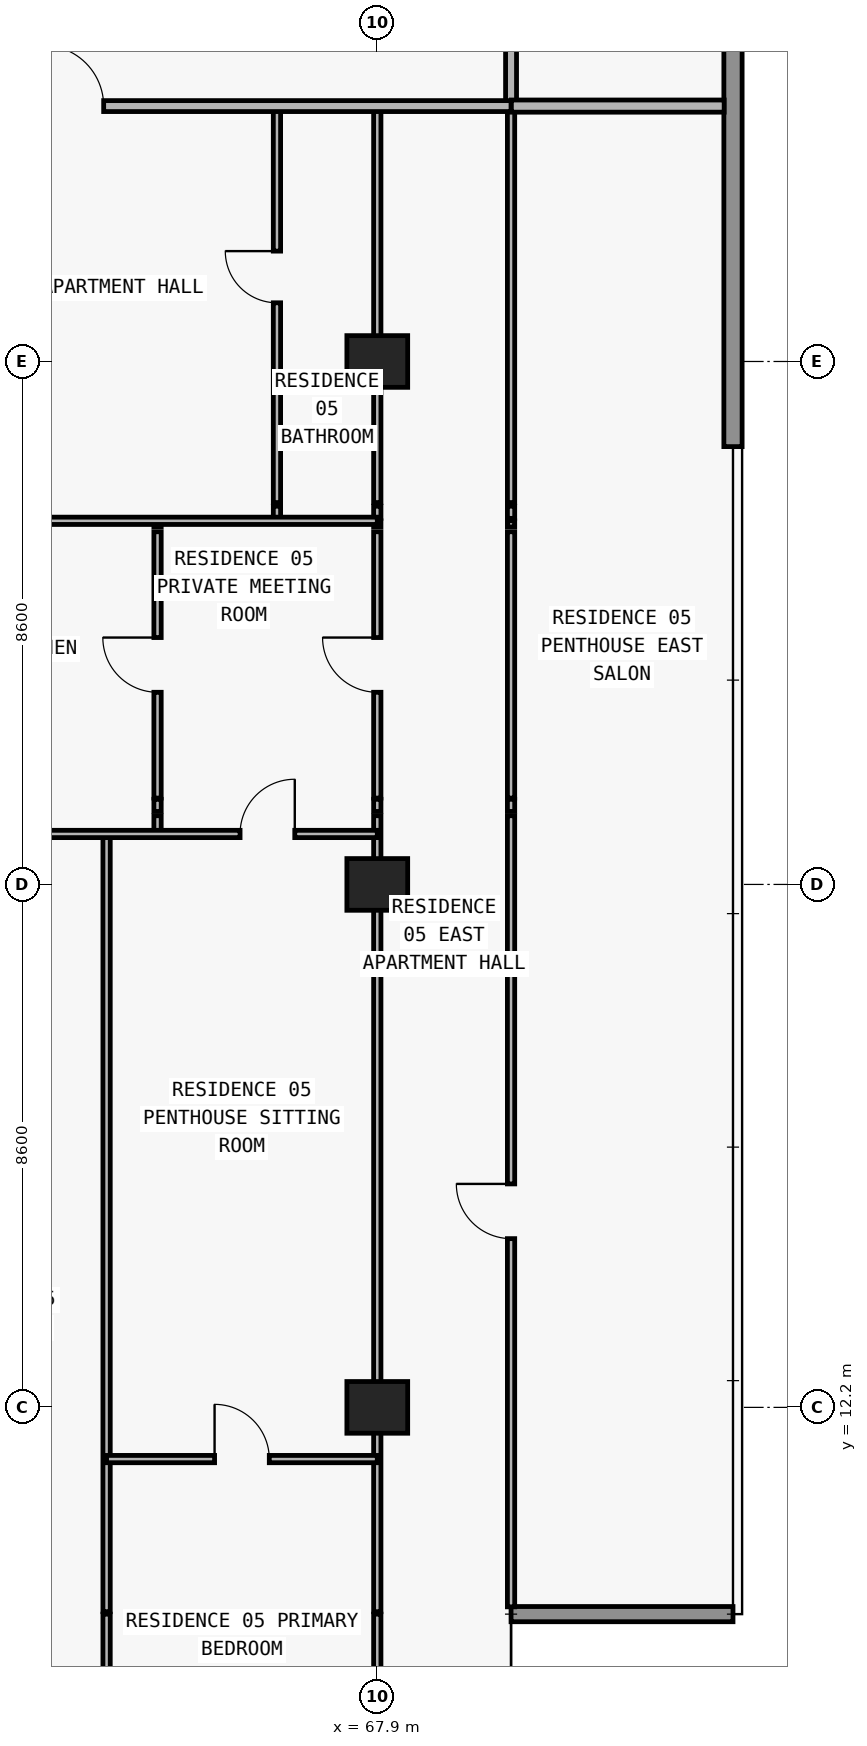
"""IFC4 building model, lengths in metres.
Left out: names, types, materials, properties, quantities, classifications, styles, units other than length and angle.
Written with IfcOpenShell. Run it as: python <this file> out.ifc"""

import sys

from ifc_helpers import new_model, si_unit, direction, frame, frame_2d, origin, origin_2d, place, context, subcontext, project, spatial, rectangle, extrude, element, fill, save


model = new_model("IFC4")
c1 = context("Model", 3, precision=1e-05, world=origin(), true_north=direction((0.0, 1.0)))
c2 = subcontext(c1, "Body", "Model", "MODEL_VIEW")
j1 = project(units=[si_unit("LENGTHUNIT", "METRE"), si_unit("PLANEANGLEUNIT", "RADIAN")], contexts=[c1])
p1 = place(None, origin())
s1 = spatial("IfcSite", under=j1, at=p1, CompositionType="ELEMENT")
p2 = place(p1, origin())
s2 = spatial("IfcBuilding", under=s1, at=p2, CompositionType="ELEMENT")
p3 = place(p2, frame((0.0, 0.0, 119.1)))
s3 = spatial("IfcBuildingStorey", under=s2, at=p3, CompositionType="ELEMENT", Elevation=119.1)
for number, where, z_axis, x_axis in (
    (1, (67.9, 12.2, 0.0), (0.0, 0.0, 1.0), (1.0, 0.0, 0.0)),
    (2, (67.9, 20.8, 0.0), (0.0, 0.0, 1.0), (1.0, 0.0, 0.0)),
    (3, (67.9, 29.4, 0.0), (0.0, 0.0, 1.0), (1.0, 0.0, 0.0)),
):
    element("IfcColumn", number, at=place(p3, frame(where, z_axis=z_axis, x_axis=x_axis)), inside=s3, PredefinedType="COLUMN", context=c2, shape_type="SweptSolid", body=[
        extrude(rectangle(XDim=1.0, YDim=0.85, at=origin_2d()), origin(), (0.0, 0.0, 1.0), 3.05),
    ])
p4 = place(p3, frame((70.1, 8.8, 0.0), z_axis=(0.0, 0.0, 1.0), x_axis=(1.0, 0.0, 0.0)))
e4 = element("IfcWall", 4, at=p4, inside=s3, PredefinedType="ELEMENTEDWALL", context=c2, shape_type="SweptSolid", body=[
    extrude(rectangle(XDim=3.65, YDim=0.25, at=frame_2d((1.825, 0.0))), origin(), (0.0, 0.0, 1.0), 3.05),
])
p5 = place(p3, frame((73.75, 47.2, 0.0), z_axis=(0.0, 0.0, 1.0), x_axis=(0.0, -1.0, 0.0)))
e5 = element("IfcWall", 5, at=p5, inside=s3, PredefinedType="STANDARD", context=c2, shape_type="SweptSolid", body=[
    extrude(rectangle(XDim=19.2, YDim=0.3, at=frame_2d((9.6, 0.0))), origin(), (0.0, 0.0, 1.0), 3.05),
])
p6 = place(p3, frame((63.448, 5.695, 0.0), z_axis=(0.0, 0.0, 1.0), x_axis=(0.0, 1.0, 0.0)))
e6 = element("IfcWall", 6, at=p6, inside=s3, PredefinedType="PARTITIONING", context=c2, shape_type="SweptSolid", body=[
    extrude(rectangle(XDim=3.105, YDim=0.12, at=frame_2d((1.552, 0.0))), origin(), (0.0, 0.0, 1.0), 3.05),
])
p7 = place(p3, frame((63.448, 8.84, 0.0), z_axis=(0.0, 0.0, 1.0), x_axis=(0.0, 1.0, 0.0)))
e7 = element("IfcWall", 7, at=p7, inside=s3, PredefinedType="PARTITIONING", context=c2, shape_type="SweptSolid", body=[
    extrude(rectangle(XDim=12.79, YDim=0.12, at=frame_2d((6.395, 0.0))), origin(), (0.0, 0.0, 1.0), 3.05),
])
p8 = place(p3, frame((64.286, 21.63, 0.0), z_axis=(0.0, 0.0, 1.0), x_axis=(0.0, 1.0, 0.0)))
e8 = element("IfcWall", 8, at=p8, inside=s3, PredefinedType="PARTITIONING", context=c2, shape_type="SweptSolid", body=[
    extrude(rectangle(XDim=0.3, YDim=0.12, at=frame_2d((0.15, 0.0))), origin(), (0.0, 0.0, 1.0), 3.05),
])
p9 = place(p3, frame((64.286, 22.0, 0.0), z_axis=(0.0, 0.0, 1.0), x_axis=(0.0, 1.0, 0.0)))
e9 = element("IfcWall", 9, at=p9, inside=s3, PredefinedType="PARTITIONING", context=c2, shape_type="SweptSolid", body=[
    extrude(rectangle(XDim=0.2, YDim=0.12, at=frame_2d((0.1, 0.0))), origin(), (0.0, 0.0, 1.0), 3.05),
])
p10 = place(p3, frame((64.286, 22.22, 0.0), z_axis=(0.0, 0.0, 1.0), x_axis=(0.0, 1.0, 0.0)))
e10 = element("IfcWall", 10, at=p10, inside=s3, PredefinedType="PARTITIONING", context=c2, shape_type="SweptSolid", body=[
    extrude(rectangle(XDim=4.38, YDim=0.12, at=frame_2d((2.19, 0.0))), origin(), (0.0, 0.0, 1.0), 3.05),
])
p11 = place(p10, frame((1.74, 0.0, 0.0)))
e11 = element("IfcOpeningElement", 11, at=p11, cuts=e10, PredefinedType="OPENING", context=c2, shape_type="SweptSolid", body=[
    extrude(rectangle(XDim=0.9, YDim=2.15, at=frame_2d((0.45, 1.075))), frame((0.0, 0.07, 0.0), z_axis=(0.0, -1.0, 0.0), x_axis=(1.0, 0.0, 0.0)), (0.0, 0.0, 1.0), 0.14),
])
p12 = place(p3, frame((64.286, 26.68, 0.0), z_axis=(0.0, 0.0, 1.0), x_axis=(0.0, 1.0, 0.0)))
e12 = element("IfcWall", 12, at=p12, inside=s3, PredefinedType="PARTITIONING", context=c2, shape_type="SweptSolid", body=[
    extrude(rectangle(XDim=0.1, YDim=0.12, at=frame_2d((0.05, 0.0))), origin(), (0.0, 0.0, 1.0), 3.05),
])
p13 = place(p3, frame((66.25, 26.82, 0.0), z_axis=(0.0, 0.0, 1.0), x_axis=(0.0, 1.0, 0.0)))
e13 = element("IfcWall", 13, at=p13, inside=s3, PredefinedType="PARTITIONING", context=c2, shape_type="SweptSolid", body=[
    extrude(rectangle(XDim=0.2, YDim=0.12, at=frame_2d((0.1, 0.0))), origin(), (0.0, 0.0, 1.0), 3.05),
])
p14 = place(p3, frame((66.25, 27.08, 0.0), z_axis=(0.0, 0.0, 1.0), x_axis=(0.0, 1.0, 0.0)))
e14 = element("IfcWall", 14, at=p14, inside=s3, PredefinedType="PARTITIONING", context=c2, shape_type="SweptSolid", body=[
    extrude(rectangle(XDim=6.52, YDim=0.12, at=frame_2d((3.26, 0.0))), origin(), (0.0, 0.0, 1.0), 3.05),
])
p15 = place(p14, frame((3.285, 0.0, 0.0)))
e15 = element("IfcOpeningElement", 15, at=p15, cuts=e14, PredefinedType="OPENING", context=c2, shape_type="SweptSolid", body=[
    extrude(rectangle(XDim=0.85, YDim=2.1, at=frame_2d((0.425, 1.05))), frame((0.0, 0.07, 0.0), z_axis=(0.0, -1.0, 0.0), x_axis=(1.0, 0.0, 0.0)), (0.0, 0.0, 1.0), 0.14),
])
p16 = place(p3, frame((67.9, 5.695, 0.0), z_axis=(0.0, 0.0, 1.0), x_axis=(0.0, 1.0, 0.0)))
e16 = element("IfcWall", 16, at=p16, inside=s3, PredefinedType="PARTITIONING", context=c2, shape_type="SweptSolid", body=[
    extrude(rectangle(XDim=3.105, YDim=0.12, at=frame_2d((1.552, 0.0))), origin(), (0.0, 0.0, 1.0), 3.05),
])
p17 = place(p3, frame((67.9, 8.84, 0.0), z_axis=(0.0, 0.0, 1.0), x_axis=(0.0, 1.0, 0.0)))
e17 = element("IfcWall", 17, at=p17, inside=s3, PredefinedType="PARTITIONING", context=c2, shape_type="SweptSolid", body=[
    extrude(rectangle(XDim=13.09, YDim=0.12, at=frame_2d((6.545, 0.0))), origin(), (0.0, 0.0, 1.0), 2.174),
])
p18 = place(p3, frame((67.9, 22.0, 0.0), z_axis=(0.0, 0.0, 1.0), x_axis=(0.0, 1.0, 0.0)))
e18 = element("IfcWall", 18, at=p18, inside=s3, PredefinedType="PARTITIONING", context=c2, shape_type="SweptSolid", body=[
    extrude(rectangle(XDim=0.2, YDim=0.12, at=frame_2d((0.1, 0.0))), origin(), (0.0, 0.0, 1.0), 2.174),
])
p19 = place(p3, frame((67.9, 22.22, 0.0), z_axis=(0.0, 0.0, 1.0), x_axis=(0.0, 1.0, 0.0)))
e19 = element("IfcWall", 19, at=p19, inside=s3, PredefinedType="PARTITIONING", context=c2, shape_type="SweptSolid", body=[
    extrude(rectangle(XDim=4.38, YDim=0.12, at=frame_2d((2.19, 0.0))), origin(), (0.0, 0.0, 1.0), 2.174),
])
p20 = place(p19, frame((1.74, 0.0, 0.0)))
e20 = element("IfcOpeningElement", 20, at=p20, cuts=e19, PredefinedType="OPENING", context=c2, shape_type="SweptSolid", body=[
    extrude(rectangle(XDim=0.9, YDim=2.124, at=frame_2d((0.45, 1.062))), frame((0.0, 0.07, 0.0), z_axis=(0.0, -1.0, 0.0), x_axis=(1.0, 0.0, 0.0)), (0.0, 0.0, 1.0), 0.14),
])
p21 = place(p3, frame((67.9, 26.68, 0.0), z_axis=(0.0, 0.0, 1.0), x_axis=(0.0, 1.0, 0.0)))
e21 = element("IfcWall", 21, at=p21, inside=s3, PredefinedType="PARTITIONING", context=c2, shape_type="SweptSolid", body=[
    extrude(rectangle(XDim=0.1, YDim=0.12, at=frame_2d((0.05, 0.0))), origin(), (0.0, 0.0, 1.0), 2.174),
])
p22 = place(p3, frame((67.9, 26.82, 0.0), z_axis=(0.0, 0.0, 1.0), x_axis=(0.0, 1.0, 0.0)))
e22 = element("IfcWall", 22, at=p22, inside=s3, PredefinedType="PARTITIONING", context=c2, shape_type="SweptSolid", body=[
    extrude(rectangle(XDim=0.2, YDim=0.12, at=frame_2d((0.1, 0.0))), origin(), (0.0, 0.0, 1.0), 2.174),
])
p23 = place(p3, frame((67.9, 27.08, 0.0), z_axis=(0.0, 0.0, 1.0), x_axis=(0.0, 1.0, 0.0)))
e23 = element("IfcWall", 23, at=p23, inside=s3, PredefinedType="PARTITIONING", context=c2, shape_type="SweptSolid", body=[
    extrude(rectangle(XDim=6.52, YDim=0.12, at=frame_2d((3.26, 0.0))), origin(), (0.0, 0.0, 1.0), 2.174),
])
p24 = place(p3, frame((70.1, 8.92, 0.0), z_axis=(0.0, 0.0, 1.0), x_axis=(0.0, 1.0, 0.0)))
e24 = element("IfcWall", 24, at=p24, inside=s3, PredefinedType="PARTITIONING", context=c2, shape_type="SweptSolid", body=[
    extrude(rectangle(XDim=13.01, YDim=0.12, at=frame_2d((6.505, 0.0))), origin(), (0.0, 0.0, 1.0), 3.05),
])
p25 = place(p24, frame((6.055, 0.0, 0.0)))
e25 = element("IfcOpeningElement", 25, at=p25, cuts=e24, PredefinedType="OPENING", context=c2, shape_type="SweptSolid", body=[
    extrude(rectangle(XDim=0.9, YDim=2.15, at=frame_2d((0.45, 1.075))), frame((0.0, 0.07, 0.0), z_axis=(0.0, -1.0, 0.0), x_axis=(1.0, 0.0, 0.0)), (0.0, 0.0, 1.0), 0.14),
])
p26 = place(p3, frame((70.1, 22.0, 0.0), z_axis=(0.0, 0.0, 1.0), x_axis=(0.0, 1.0, 0.0)))
e26 = element("IfcWall", 26, at=p26, inside=s3, PredefinedType="PARTITIONING", context=c2, shape_type="SweptSolid", body=[
    extrude(rectangle(XDim=0.2, YDim=0.12, at=frame_2d((0.1, 0.0))), origin(), (0.0, 0.0, 1.0), 3.05),
])
p27 = place(p3, frame((70.1, 22.22, 0.0), z_axis=(0.0, 0.0, 1.0), x_axis=(0.0, 1.0, 0.0)))
e27 = element("IfcWall", 27, at=p27, inside=s3, PredefinedType="PARTITIONING", context=c2, shape_type="SweptSolid", body=[
    extrude(rectangle(XDim=4.38, YDim=0.12, at=frame_2d((2.19, 0.0))), origin(), (0.0, 0.0, 1.0), 3.05),
])
p28 = place(p3, frame((70.1, 26.68, 0.0), z_axis=(0.0, 0.0, 1.0), x_axis=(0.0, 1.0, 0.0)))
e28 = element("IfcWall", 28, at=p28, inside=s3, PredefinedType="PARTITIONING", context=c2, shape_type="SweptSolid", body=[
    extrude(rectangle(XDim=0.1, YDim=0.12, at=frame_2d((0.05, 0.0))), origin(), (0.0, 0.0, 1.0), 3.05),
])
p29 = place(p3, frame((70.1, 26.82, 0.0), z_axis=(0.0, 0.0, 1.0), x_axis=(0.0, 1.0, 0.0)))
e29 = element("IfcWall", 29, at=p29, inside=s3, PredefinedType="PARTITIONING", context=c2, shape_type="SweptSolid", body=[
    extrude(rectangle(XDim=0.2, YDim=0.12, at=frame_2d((0.1, 0.0))), origin(), (0.0, 0.0, 1.0), 3.05),
])
p30 = place(p3, frame((70.1, 27.08, 0.0), z_axis=(0.0, 0.0, 1.0), x_axis=(0.0, 1.0, 0.0)))
e30 = element("IfcWall", 30, at=p30, inside=s3, PredefinedType="PARTITIONING", context=c2, shape_type="SweptSolid", body=[
    extrude(rectangle(XDim=6.52, YDim=0.12, at=frame_2d((3.26, 0.0))), origin(), (0.0, 0.0, 1.0), 3.05),
])
p31 = place(p3, frame((70.1, 33.605, 0.0), z_axis=(0.0, 0.0, 1.0), x_axis=(0.0, 1.0, 0.0)))
e31 = element("IfcWall", 31, at=p31, inside=s3, PredefinedType="PARTITIONING", context=c2, shape_type="SweptSolid", body=[
    extrude(rectangle(XDim=3.345, YDim=0.18, at=frame_2d((1.672, 0.0))), origin(), (0.0, 0.0, 1.0), 3.05),
])
p32 = place(p3, frame((63.448, 11.35, 0.0), z_axis=(0.0, 0.0, 1.0), x_axis=(1.0, 0.0, 0.0)))
e32 = element("IfcWall", 32, at=p32, inside=s3, PredefinedType="PARTITIONING", context=c2, shape_type="SweptSolid", body=[
    extrude(rectangle(XDim=4.452, YDim=0.12, at=frame_2d((2.226, 0.0))), origin(), (0.0, 0.0, 1.0), 3.05),
])
p33 = place(p32, frame((1.776, 0.0, 0.0)))
e33 = element("IfcOpeningElement", 33, at=p33, cuts=e32, PredefinedType="OPENING", context=c2, shape_type="SweptSolid", body=[
    extrude(rectangle(XDim=0.9, YDim=2.15, at=frame_2d((0.45, 1.075))), frame((0.0, 0.07, 0.0), z_axis=(0.0, -1.0, 0.0), x_axis=(1.0, 0.0, 0.0)), (0.0, 0.0, 1.0), 0.14),
])
p34 = place(p3, frame((59.55, 21.63, 0.0), z_axis=(0.0, 0.0, 1.0), x_axis=(1.0, 0.0, 0.0)))
e34 = element("IfcWall", 34, at=p34, inside=s3, PredefinedType="PARTITIONING", context=c2, shape_type="SweptSolid", body=[
    extrude(rectangle(XDim=8.35, YDim=0.12, at=frame_2d((4.175, 0.0))), origin(), (0.0, 0.0, 1.0), 3.05),
])
p35 = place(p34, frame((1.499, 0.0, 0.0)))
e35 = element("IfcOpeningElement", 35, at=p35, cuts=e34, PredefinedType="OPENING", context=c2, shape_type="SweptSolid", body=[
    extrude(rectangle(XDim=0.9, YDim=2.15, at=frame_2d((0.45, 1.075))), frame((0.0, 0.07, 0.0), z_axis=(0.0, -1.0, 0.0), x_axis=(1.0, 0.0, 0.0)), (0.0, 0.0, 1.0), 0.14),
])
p36 = place(p34, frame((6.093, 0.0, 0.0)))
e36 = element("IfcOpeningElement", 36, at=p36, cuts=e34, PredefinedType="OPENING", context=c2, shape_type="SweptSolid", body=[
    extrude(rectangle(XDim=0.9, YDim=2.15, at=frame_2d((0.45, 1.075))), frame((0.0, 0.07, 0.0), z_axis=(0.0, -1.0, 0.0), x_axis=(1.0, 0.0, 0.0)), (0.0, 0.0, 1.0), 0.14),
])
p37 = place(p3, frame((59.55, 26.78, 0.0), z_axis=(0.0, 0.0, 1.0), x_axis=(1.0, 0.0, 0.0)))
e37 = element("IfcWall", 37, at=p37, inside=s3, PredefinedType="PARTITIONING", context=c2, shape_type="SweptSolid", body=[
    extrude(rectangle(XDim=8.35, YDim=0.12, at=frame_2d((4.175, 0.0))), origin(), (0.0, 0.0, 1.0), 3.05),
])
p38 = place(p37, frame((1.918, 0.0, 0.0)))
e38 = element("IfcOpeningElement", 38, at=p38, cuts=e37, PredefinedType="OPENING", context=c2, shape_type="SweptSolid", body=[
    extrude(rectangle(XDim=0.9, YDim=2.15, at=frame_2d((0.45, 1.075))), frame((0.0, 0.07, 0.0), z_axis=(0.0, -1.0, 0.0), x_axis=(1.0, 0.0, 0.0)), (0.0, 0.0, 1.0), 0.14),
])
p39 = place(p3, frame((59.55, 33.6, 0.0), z_axis=(0.0, 0.0, 1.0), x_axis=(1.0, 0.0, 0.0)))
e39 = element("IfcWall", 39, at=p39, inside=s3, PredefinedType="PARTITIONING", context=c2, shape_type="SweptSolid", body=[
    extrude(rectangle(XDim=10.55, YDim=0.18, at=frame_2d((5.275, 0.0))), origin(), (0.0, 0.0, 1.0), 3.05),
])
p40 = place(p39, frame((2.85, 0.0, 0.0)))
e40 = element("IfcOpeningElement", 40, at=p40, cuts=e39, PredefinedType="OPENING", context=c2, shape_type="SweptSolid", body=[
    extrude(rectangle(XDim=1.0, YDim=2.2, at=frame_2d((0.5, 1.1))), frame((0.0, 0.1, 0.0), z_axis=(0.0, -1.0, 0.0), x_axis=(1.0, 0.0, 0.0)), (0.0, 0.0, 1.0), 0.2),
])
p41 = place(p3, frame((70.105, 33.6, 0.0), z_axis=(0.0, 0.0, 1.0), x_axis=(1.0, 0.0, 0.0)))
e41 = element("IfcWall", 41, at=p41, inside=s3, PredefinedType="PARTITIONING", context=c2, shape_type="SweptSolid", body=[
    extrude(rectangle(XDim=3.5, YDim=0.2, at=frame_2d((1.75, 0.0))), origin(), (0.0, 0.0, 1.0), 3.05),
])
p42 = place(p40, origin())
e42 = element("IfcDoor", 42, at=p42, inside=s3, OperationType="SINGLE_SWING_LEFT", PredefinedType="DOOR", context=c2, shape_type="SweptSolid", body=[
    extrude(rectangle(XDim=1.0, YDim=2.2, at=frame_2d((0.5, 1.1))), frame((0.0, 0.025, 0.0), z_axis=(0.0, -1.0, 0.0), x_axis=(1.0, 0.0, 0.0)), (0.0, 0.0, 1.0), 0.05),
])
fill(e40, e42)
p43 = place(p15, origin())
e43 = element("IfcDoor", 43, at=p43, inside=s3, OperationType="SINGLE_SWING_RIGHT", PredefinedType="DOOR", context=c2, shape_type="SweptSolid", body=[
    extrude(rectangle(XDim=0.85, YDim=2.1, at=frame_2d((0.425, 1.05))), frame((0.0, 0.025, 0.0), z_axis=(0.0, -1.0, 0.0), x_axis=(1.0, 0.0, 0.0)), (0.0, 0.0, 1.0), 0.05),
])
fill(e15, e43)
p44 = place(p11, origin())
e44 = element("IfcDoor", 44, at=p44, inside=s3, OperationType="SINGLE_SWING_RIGHT", PredefinedType="DOOR", context=c2, shape_type="SweptSolid", body=[
    extrude(rectangle(XDim=0.9, YDim=2.15, at=frame_2d((0.45, 1.075))), frame((0.0, 0.025, 0.0), z_axis=(0.0, -1.0, 0.0), x_axis=(1.0, 0.0, 0.0)), (0.0, 0.0, 1.0), 0.05),
])
fill(e11, e44)
p45 = place(p36, origin())
e45 = element("IfcDoor", 45, at=p45, inside=s3, OperationType="SINGLE_SWING_RIGHT", PredefinedType="DOOR", context=c2, shape_type="SweptSolid", body=[
    extrude(rectangle(XDim=0.9, YDim=2.15, at=frame_2d((0.45, 1.075))), frame((0.0, 0.025, 0.0), z_axis=(0.0, -1.0, 0.0), x_axis=(1.0, 0.0, 0.0)), (0.0, 0.0, 1.0), 0.05),
])
fill(e36, e45)
p46 = place(p33, origin())
e46 = element("IfcDoor", 46, at=p46, inside=s3, OperationType="SINGLE_SWING_LEFT", PredefinedType="DOOR", context=c2, shape_type="SweptSolid", body=[
    extrude(rectangle(XDim=0.9, YDim=2.15, at=frame_2d((0.45, 1.075))), frame((0.0, 0.025, 0.0), z_axis=(0.0, -1.0, 0.0), x_axis=(1.0, 0.0, 0.0)), (0.0, 0.0, 1.0), 0.05),
])
fill(e33, e46)
p47 = place(p20, origin())
e47 = element("IfcDoor", 47, at=p47, inside=s3, OperationType="SINGLE_SWING_RIGHT", PredefinedType="DOOR", context=c2, shape_type="SweptSolid", body=[
    extrude(rectangle(XDim=0.9, YDim=2.124, at=frame_2d((0.45, 1.062))), frame((0.0, 0.025, 0.0), z_axis=(0.0, -1.0, 0.0), x_axis=(1.0, 0.0, 0.0)), (0.0, 0.0, 1.0), 0.05),
])
fill(e20, e47)
p48 = place(p25, origin())
e48 = element("IfcDoor", 48, at=p48, inside=s3, OperationType="SINGLE_SWING_RIGHT", PredefinedType="DOOR", context=c2, shape_type="SweptSolid", body=[
    extrude(rectangle(XDim=0.9, YDim=2.15, at=frame_2d((0.45, 1.075))), frame((0.0, 0.025, 0.0), z_axis=(0.0, -1.0, 0.0), x_axis=(1.0, 0.0, 0.0)), (0.0, 0.0, 1.0), 0.05),
])
fill(e25, e48)
save(model, sys.argv[1])
